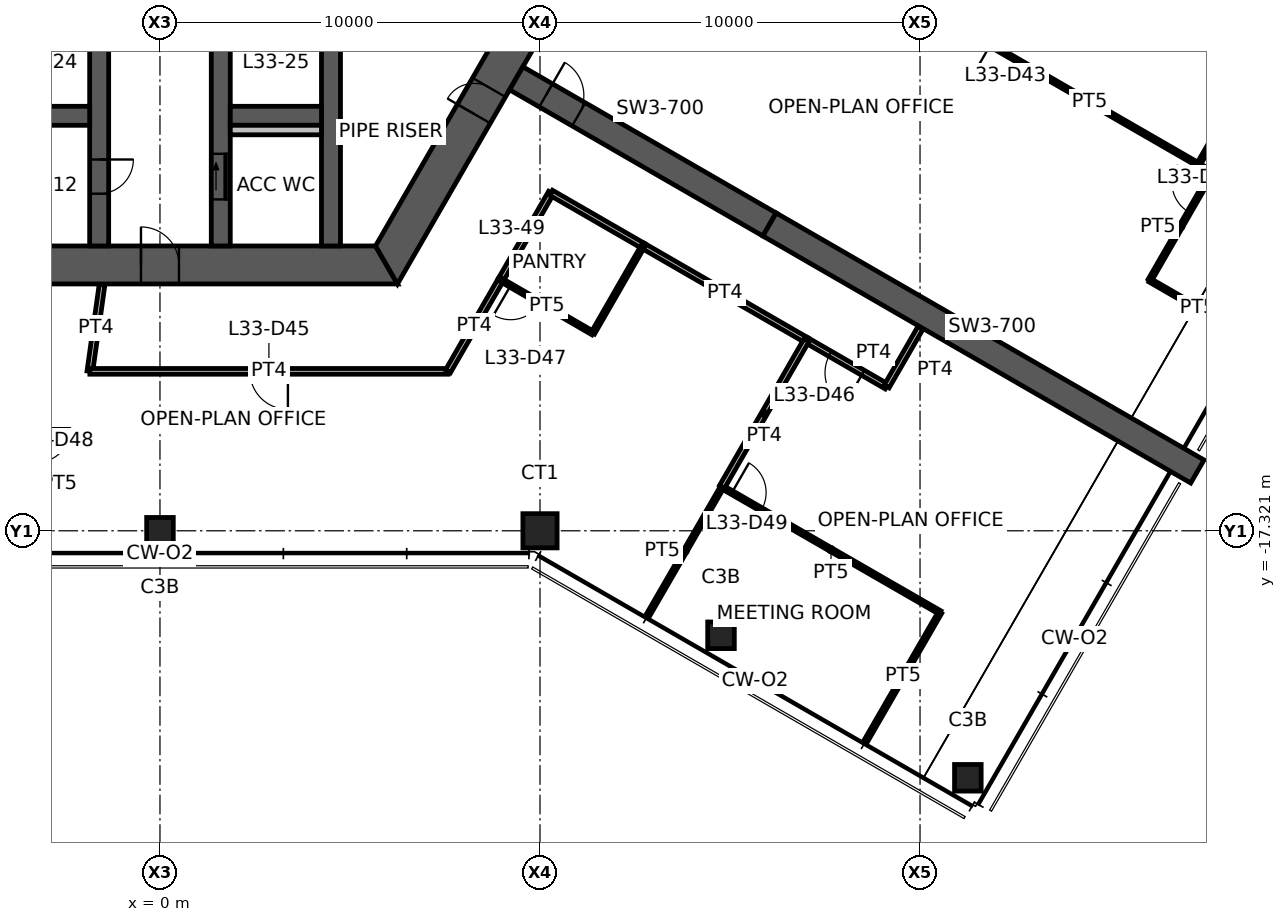
"""IFC4 building model, lengths in metres.
Left out: names, types, materials, properties, quantities, classifications, styles, units other than length and angle.
Written with IfcOpenShell. Run it as: python <this file> out.ifc"""

import sys

from ifc_helpers import new_model, si_unit, direction, frame, frame_2d, origin, origin_2d, place, context, subcontext, project, spatial, polyline, rectangle, hollow_rectangle, outline, extrude, element, fill, save


model = new_model("IFC4")
c1 = context("Model", 3, precision=1e-05, world=origin(), true_north=direction((0.0, 1.0)))
c2 = subcontext(c1, "Body", "Model", "MODEL_VIEW")
j1 = project(units=[si_unit("LENGTHUNIT", "METRE"), si_unit("PLANEANGLEUNIT", "RADIAN")], contexts=[c1])
p1 = place(None, origin())
s1 = spatial("IfcSite", under=j1, at=p1, CompositionType="ELEMENT")
p2 = place(p1, origin())
s2 = spatial("IfcBuilding", under=s1, at=p2, CompositionType="ELEMENT")
p3 = place(p2, frame((0.0, 0.0, 133.1)))
s3 = spatial("IfcBuildingStorey", under=s2, at=p3, CompositionType="ELEMENT", Elevation=133.1)
p4 = place(p3, frame((10.0, -17.321, 0.0), z_axis=(0.0, 0.0, 1.0), x_axis=(1.0, 0.0, 0.0)))
e1 = element("IfcColumn", 1, at=p4, inside=s3, PredefinedType="COLUMN", context=c2, shape_type="SweptSolid", body=[
    extrude(hollow_rectangle(XDim=0.9, YDim=0.9, WallThickness=0.07, at=origin_2d()), origin(), (0.0, 0.0, 1.0), 3.9),
])
for number, where, z_axis, x_axis in (
    (2, (0.0, -17.321, 0.0), (0.0, 0.0, 1.0), (1.0, 0.0, 0.0)),
    (3, (14.763, -20.071, 0.0), (0.0, 0.0, 1.0), (1.0, 0.0, 0.0)),
    (4, (21.258, -23.821, 0.0), (0.0, 0.0, 1.0), (1.0, 0.0, 0.0)),
):
    element("IfcColumn", number, at=place(p3, frame(where, z_axis=z_axis, x_axis=x_axis)), inside=s3, PredefinedType="COLUMN", context=c2, shape_type="SweptSolid", body=[
        extrude(hollow_rectangle(XDim=0.7, YDim=0.7, WallThickness=0.036, at=origin_2d()), origin(), (0.0, 0.0, 1.0), 3.9),
    ])
p5 = place(p3, frame((-5.961, -10.325, 0.0), z_axis=(0.0, 0.0, 1.0), x_axis=(1.0, 0.0, 0.0)))
e5 = element("IfcWall", 5, at=p5, inside=s3, PredefinedType="SHEAR", context=c2, shape_type="SweptSolid", body=[
    extrude(outline(polyline([(-0.289, -0.5), (5.461, -0.5), (6.461, -0.5), (12.211, -0.5), (11.634, 0.5), (6.461, 0.5), (5.461, 0.5), (0.289, 0.5), (-0.289, -0.5)])), origin(), (0.0, 0.0, 1.0), 3.9),
])
p6 = place(p5, frame((5.461, 0.0, 0.0)))
e6 = element("IfcOpeningElement", 6, at=p6, cuts=e5, PredefinedType="OPENING", context=c2, shape_type="SweptSolid", body=[
    extrude(rectangle(XDim=1.0, YDim=2.1, at=frame_2d((0.5, 1.05))), frame((0.0, 0.51, 0.0), z_axis=(0.0, -1.0, 0.0), x_axis=(1.0, 0.0, 0.0)), (0.0, 0.0, 1.0), 1.02),
])
p7 = place(p3, frame((5.961, -10.325, 0.0), z_axis=(0.0, 0.0, 1.0), x_axis=(0.500004296715, 0.866022923061, 0.0)))
e7 = element("IfcWall", 7, at=p7, inside=s3, PredefinedType="SHEAR", context=c2, shape_type="SweptSolid", body=[
    extrude(outline(polyline([(-0.289, -0.5), (4.594, -0.5), (5.394, -0.5), (12.211, -0.5), (11.634, 0.5), (5.394, 0.5), (4.594, 0.5), (0.289, 0.5), (-0.289, -0.5)])), origin(), (0.0, 0.0, 1.0), 3.9),
])
p8 = place(p7, frame((4.594, 0.0, 0.0)))
e8 = element("IfcOpeningElement", 8, at=p8, cuts=e7, PredefinedType="OPENING", context=c2, shape_type="SweptSolid", body=[
    extrude(rectangle(XDim=0.8, YDim=2.1, at=frame_2d((0.4, 1.05))), frame((0.0, 0.51, 0.0), z_axis=(0.0, -1.0, 0.0), x_axis=(1.0, 0.0, 0.0)), (0.0, 0.0, 1.0), 1.02),
])
p9 = place(p3, frame((9.375, -5.413, 0.0), z_axis=(0.0, 0.0, 1.0), x_axis=(0.866032377459, -0.499987921047, 0.0)))
e9 = element("IfcWall", 9, at=p9, inside=s3, PredefinedType="SHEAR", context=c2, shape_type="SweptSolid", body=[
    extrude(rectangle(XDim=7.696, YDim=0.7, at=frame_2d((3.848, 0.0))), origin(), (0.0, 0.0, 1.0), 3.9),
])
p10 = place(p9, frame((0.9, 0.0, 0.0)))
e10 = element("IfcOpeningElement", 10, at=p10, cuts=e9, PredefinedType="OPENING", context=c2, shape_type="SweptSolid", body=[
    extrude(rectangle(XDim=1.0, YDim=2.1, at=frame_2d((0.5, 1.05))), frame((0.0, 0.36, 0.0), z_axis=(0.0, -1.0, 0.0), x_axis=(1.0, 0.0, 0.0)), (0.0, 0.0, 1.0), 0.72),
])
p11 = place(p3, frame((16.039, -9.26, 0.0), z_axis=(0.0, 0.0, 1.0), x_axis=(0.866024837091, -0.50000098154, 0.0)))
e11 = element("IfcWall", 11, at=p11, inside=s3, PredefinedType="SHEAR", context=c2, shape_type="SweptSolid", body=[
    extrude(rectangle(XDim=13.0, YDim=0.7, at=frame_2d((6.5, 0.0))), origin(), (0.0, 0.0, 1.0), 3.9),
])
p12 = place(p3, frame((-1.6, -3.85, 0.0), z_axis=(0.0, 0.0, 1.0), x_axis=(0.0, -1.0, 0.0)))
e12 = element("IfcWall", 12, at=p12, inside=s3, PredefinedType="SHEAR", context=c2, shape_type="SweptSolid", body=[
    extrude(rectangle(XDim=5.975, YDim=0.5, at=frame_2d((2.987, 0.0))), origin(), (0.0, 0.0, 1.0), 3.9),
])
p13 = place(p12, frame((3.7, 0.0, 0.0)))
e13 = element("IfcOpeningElement", 13, at=p13, cuts=e12, PredefinedType="OPENING", context=c2, shape_type="SweptSolid", body=[
    extrude(rectangle(XDim=0.9, YDim=2.1, at=frame_2d((0.45, 1.05))), frame((0.0, 0.26, 0.0), z_axis=(0.0, -1.0, 0.0), x_axis=(1.0, 0.0, 0.0)), (0.0, 0.0, 1.0), 0.52),
])
p14 = place(p3, frame((1.6, -3.85, 0.0), z_axis=(0.0, 0.0, 1.0), x_axis=(0.0, -1.0, 0.0)))
e14 = element("IfcWall", 14, at=p14, inside=s3, PredefinedType="SHEAR", context=c2, shape_type="SweptSolid", body=[
    extrude(rectangle(XDim=5.975, YDim=0.5, at=frame_2d((2.987, 0.0))), origin(), (0.0, 0.0, 1.0), 3.9),
])
p15 = place(p14, frame((3.55, 0.0, 0.0)))
e15 = element("IfcOpeningElement", 15, at=p15, cuts=e14, PredefinedType="OPENING", context=c2, shape_type="SweptSolid", body=[
    extrude(rectangle(XDim=1.2, YDim=2.1, at=frame_2d((0.6, 1.05))), frame((0.0, 0.26, 0.0), z_axis=(0.0, -1.0, 0.0), x_axis=(1.0, 0.0, 0.0)), (0.0, 0.0, 1.0), 0.52),
])
p16 = place(p3, frame((4.5, -3.85, 0.0), z_axis=(0.0, 0.0, 1.0), x_axis=(0.0, -1.0, 0.0)))
e16 = element("IfcWall", 16, at=p16, inside=s3, PredefinedType="SHEAR", context=c2, shape_type="SweptSolid", body=[
    extrude(rectangle(XDim=5.975, YDim=0.5, at=frame_2d((2.987, 0.0))), origin(), (0.0, 0.0, 1.0), 3.9),
])
for number, where, z_axis, x_axis in (
    (17, (-4.25, -6.4, 0.0), (0.0, 0.0, 1.0), (1.0, 0.0, 0.0)),
    (18, (1.85, -6.4, 0.0), (0.0, 0.0, 1.0), (1.0, 0.0, 0.0)),
):
    element("IfcWall", number, at=place(p3, frame(where, z_axis=z_axis, x_axis=x_axis)), inside=s3, PredefinedType="SHEAR", context=c2, shape_type="SweptSolid", body=[
        extrude(rectangle(XDim=2.4, YDim=0.5, at=frame_2d((1.2, 0.0))), origin(), (0.0, 0.0, 1.0), 3.9),
    ])
p17 = place(p3, frame((1.85, -6.775, 0.0), z_axis=(0.0, 0.0, 1.0), x_axis=(1.0, 0.0, 0.0)))
e19 = element("IfcWall", 19, at=p17, inside=s3, PredefinedType="PLUMBINGWALL", context=c2, shape_type="SweptSolid", body=[
    extrude(rectangle(XDim=2.4, YDim=0.25, at=frame_2d((1.2, 0.0))), origin(), (0.0, 0.0, 1.0), 3.9),
])
p18 = place(p3, frame((29.077, -4.658, 0.0), z_axis=(0.0, 0.0, 1.0), x_axis=(-0.501313567819, -0.865265685625, 0.0)))
e20 = element("IfcWall", 20, at=p18, inside=s3, PredefinedType="PARTITIONING", context=c2, shape_type="SweptSolid", body=[
    extrude(rectangle(XDim=3.505, YDim=0.1, at=frame_2d((1.752, 0.0))), origin(), (0.0, 0.0, 1.0), 2.95),
])
p19 = place(p3, frame((27.327, -7.69, 0.0), z_axis=(0.0, 0.0, 1.0), x_axis=(-0.866318796728, 0.499491483847, 0.0)))
e21 = element("IfcWall", 21, at=p19, inside=s3, PredefinedType="PARTITIONING", context=c2, shape_type="SweptSolid", body=[
    extrude(rectangle(XDim=6.62, YDim=0.1, at=frame_2d((3.31, 0.0))), origin(), (0.0, 0.0, 1.0), 2.95),
])
p20 = place(p19, frame((5.42, 0.0, 0.0)))
e22 = element("IfcOpeningElement", 22, at=p20, cuts=e21, PredefinedType="OPENING", context=c2, shape_type="SweptSolid", body=[
    extrude(rectangle(XDim=0.9, YDim=2.1, at=frame_2d((0.45, 1.05))), frame((0.0, 0.06, 0.0), z_axis=(0.0, -1.0, 0.0), x_axis=(1.0, 0.0, 0.0)), (0.0, 0.0, 1.0), 0.12),
])
p21 = place(p3, frame((26.046, -10.727, 0.0), z_axis=(0.0, 0.0, 1.0), x_axis=(0.499765599164, 0.866160692881, 0.0)))
e23 = element("IfcWall", 23, at=p21, inside=s3, PredefinedType="PARTITIONING", context=c2, shape_type="SweptSolid", body=[
    extrude(rectangle(XDim=3.266, YDim=0.1, at=frame_2d((1.633, 0.0))), origin(), (0.0, 0.0, 1.0), 2.95),
])
p22 = place(p21, frame((2.066, 0.0, 0.0)))
e24 = element("IfcOpeningElement", 24, at=p22, cuts=e23, PredefinedType="OPENING", context=c2, shape_type="SweptSolid", body=[
    extrude(rectangle(XDim=0.9, YDim=2.1, at=frame_2d((0.45, 1.05))), frame((0.0, 0.06, 0.0), z_axis=(0.0, -1.0, 0.0), x_axis=(1.0, 0.0, 0.0)), (0.0, 0.0, 1.0), 0.12),
])
p23 = place(p3, frame((27.678, -7.898, 0.0), z_axis=(0.0, 0.0, 1.0), x_axis=(-0.859748322004, 0.510717948394, 0.0)))
e25 = element("IfcWall", 25, at=p23, inside=s3, PredefinedType="PARTITIONING", context=c2, shape_type="SweptSolid", body=[
    extrude(rectangle(XDim=0.409, YDim=0.1, at=frame_2d((0.205, 0.0))), origin(), (0.0, 0.0, 1.0), 2.95),
])
p24 = place(p3, frame((28.562, -12.18, 0.0), z_axis=(0.0, 0.0, 1.0), x_axis=(-0.866031657677, 0.499989167784, 0.0)))
e26 = element("IfcWall", 26, at=p24, inside=s3, PredefinedType="PARTITIONING", context=c2, shape_type="SweptSolid", body=[
    extrude(rectangle(XDim=2.905, YDim=0.1, at=frame_2d((1.453, 0.0))), origin(), (0.0, 0.0, 1.0), 2.95),
])
p25 = place(p3, frame((10.292, -8.425, 0.0), z_axis=(0.0, 0.0, 1.0), x_axis=(-0.499966561876, -0.866044708433, 0.0)))
e27 = element("IfcWall", 27, at=p25, inside=s3, PredefinedType="PARTITIONING", context=c2, shape_type="SweptSolid", body=[
    extrude(rectangle(XDim=2.655, YDim=0.15, at=frame_2d((1.328, 0.0))), origin(), (0.0, 0.0, 1.0), 2.95),
])
p26 = place(p3, frame((12.721, -9.827, 0.0), z_axis=(0.0, 0.0, 1.0), x_axis=(-0.866049342339, 0.499958534914, 0.0)))
e28 = element("IfcWall", 28, at=p26, inside=s3, PredefinedType="PARTITIONING", context=c2, shape_type="SweptSolid", body=[
    extrude(rectangle(XDim=2.805, YDim=0.15, at=frame_2d((1.402, 0.0))), origin(), (0.0, 0.0, 1.0), 2.95),
])
p27 = place(p3, frame((-1.844, -13.125, 0.0), z_axis=(0.0, 0.0, 1.0), x_axis=(0.139119980631, 0.990275532864, 0.0)))
e29 = element("IfcWall", 29, at=p27, inside=s3, PredefinedType="PARTITIONING", context=c2, shape_type="SweptSolid", body=[
    extrude(rectangle(XDim=2.302, YDim=0.15, at=frame_2d((1.151, 0.0))), origin(), (0.0, 0.0, 1.0), 2.95),
])
p28 = place(p3, frame((7.578, -13.125, 0.0), z_axis=(0.0, 0.0, 1.0), x_axis=(-1.0, 0.0, 0.0)))
e30 = element("IfcWall", 30, at=p28, inside=s3, PredefinedType="PARTITIONING", context=c2, shape_type="SweptSolid", body=[
    extrude(rectangle(XDim=9.422, YDim=0.15, at=frame_2d((4.711, 0.0))), origin(), (0.0, 0.0, 1.0), 2.95),
])
p29 = place(p28, frame((4.211, 0.0, 0.0)))
e31 = element("IfcOpeningElement", 31, at=p29, cuts=e30, PredefinedType="OPENING", context=c2, shape_type="SweptSolid", body=[
    extrude(rectangle(XDim=1.0, YDim=2.1, at=frame_2d((0.5, 1.05))), frame((0.0, 0.085, 0.0), z_axis=(0.0, -1.0, 0.0), x_axis=(1.0, 0.0, 0.0)), (0.0, 0.0, 1.0), 0.17),
])
p30 = place(p3, frame((8.969, -10.716, 0.0), z_axis=(0.0, 0.0, 1.0), x_axis=(-0.500008568482, -0.866020456713, 0.0)))
e32 = element("IfcWall", 32, at=p30, inside=s3, PredefinedType="PARTITIONING", context=c2, shape_type="SweptSolid", body=[
    extrude(rectangle(XDim=2.782, YDim=0.15, at=frame_2d((1.391, 0.0))), origin(), (0.0, 0.0, 1.0), 2.95),
])
p31 = place(p3, frame((17.021, -12.31, 0.0), z_axis=(0.0, 0.0, 1.0), x_axis=(-0.866018071205, 0.500012700186, 0.0)))
e33 = element("IfcWall", 33, at=p31, inside=s3, PredefinedType="PARTITIONING", context=c2, shape_type="SweptSolid", body=[
    extrude(rectangle(XDim=4.975, YDim=0.15, at=frame_2d((2.488, 0.0))), origin(), (0.0, 0.0, 1.0), 2.95),
])
p32 = place(p3, frame((19.121, -13.522, 0.0), z_axis=(0.0, 0.0, 1.0), x_axis=(-0.866000196749, 0.500043657324, 0.0)))
e34 = element("IfcWall", 34, at=p32, inside=s3, PredefinedType="PARTITIONING", context=c2, shape_type="SweptSolid", body=[
    extrude(rectangle(XDim=2.434, YDim=0.15, at=frame_2d((1.217, 0.0))), origin(), (0.0, 0.0, 1.0), 2.95),
])
p33 = place(p32, frame((0.717, 0.0, 0.0)))
e35 = element("IfcOpeningElement", 35, at=p33, cuts=e34, PredefinedType="OPENING", context=c2, shape_type="SweptSolid", body=[
    extrude(rectangle(XDim=1.0, YDim=2.1, at=frame_2d((0.5, 1.05))), frame((0.0, 0.085, 0.0), z_axis=(0.0, -1.0, 0.0), x_axis=(1.0, 0.0, 0.0)), (0.0, 0.0, 1.0), 0.17),
])
p34 = place(p3, frame((20.011, -11.981, 0.0), z_axis=(0.0, 0.0, 1.0), x_axis=(-0.500062787734, -0.865989150234, 0.0)))
e36 = element("IfcWall", 36, at=p34, inside=s3, PredefinedType="PARTITIONING", context=c2, shape_type="SweptSolid", body=[
    extrude(rectangle(XDim=1.78, YDim=0.15, at=frame_2d((0.89, 0.0))), origin(), (0.0, 0.0, 1.0), 2.95),
])
p35 = place(p3, frame((11.392, -12.119, 0.0), z_axis=(0.0, 0.0, 1.0), x_axis=(-0.865255114713, 0.501331812737, 0.0)))
e37 = element("IfcWall", 37, at=p35, inside=s3, PredefinedType="PARTITIONING", context=c2, shape_type="SweptSolid", body=[
    extrude(rectangle(XDim=2.8, YDim=0.1, at=frame_2d((1.4, 0.0))), origin(), (0.0, 0.0, 1.0), 2.95),
])
p36 = place(p35, frame((1.6, 0.0, 0.0)))
e38 = element("IfcOpeningElement", 38, at=p36, cuts=e37, PredefinedType="OPENING", context=c2, shape_type="SweptSolid", body=[
    extrude(rectangle(XDim=0.9, YDim=2.1, at=frame_2d((0.45, 1.05))), frame((0.0, 0.06, 0.0), z_axis=(0.0, -1.0, 0.0), x_axis=(1.0, 0.0, 0.0)), (0.0, 0.0, 1.0), 0.12),
])
p37 = place(p3, frame((12.713, -9.822, 0.0), z_axis=(0.0, 0.0, 1.0), x_axis=(-0.49852824611, -0.866873455488, 0.0)))
e39 = element("IfcWall", 39, at=p37, inside=s3, PredefinedType="PARTITIONING", context=c2, shape_type="SweptSolid", body=[
    extrude(rectangle(XDim=2.65, YDim=0.1, at=frame_2d((1.325, 0.0))), origin(), (0.0, 0.0, 1.0), 2.95),
])
p38 = place(p3, frame((12.84, -19.543, 0.0), z_axis=(0.0, 0.0, 1.0), x_axis=(0.501092951989, 0.865393467428, 0.0)))
e40 = element("IfcWall", 40, at=p38, inside=s3, PredefinedType="PARTITIONING", context=c2, shape_type="SweptSolid", body=[
    extrude(rectangle(XDim=3.905, YDim=0.1, at=frame_2d((1.953, 0.0))), origin(), (0.0, 0.0, 1.0), 2.95),
])
p39 = place(p3, frame((14.79, -16.165, 0.0), z_axis=(0.0, 0.0, 1.0), x_axis=(0.866359914703, -0.499420161984, 0.0)))
e41 = element("IfcWall", 41, at=p39, inside=s3, PredefinedType="PARTITIONING", context=c2, shape_type="SweptSolid", body=[
    extrude(rectangle(XDim=6.619, YDim=0.1, at=frame_2d((3.31, 0.0))), origin(), (0.0, 0.0, 1.0), 2.95),
])
p40 = place(p39, frame((0.3, 0.0, 0.0)))
e42 = element("IfcOpeningElement", 42, at=p40, cuts=e41, PredefinedType="OPENING", context=c2, shape_type="SweptSolid", body=[
    extrude(rectangle(XDim=0.9, YDim=2.1, at=frame_2d((0.45, 1.05))), frame((0.0, 0.06, 0.0), z_axis=(0.0, -1.0, 0.0), x_axis=(1.0, 0.0, 0.0)), (0.0, 0.0, 1.0), 0.12),
])
p41 = place(p3, frame((20.525, -19.471, 0.0), z_axis=(0.0, 0.0, 1.0), x_axis=(-0.499996613652, -0.866027358884, 0.0)))
e43 = element("IfcWall", 43, at=p41, inside=s3, PredefinedType="PARTITIONING", context=c2, shape_type="SweptSolid", body=[
    extrude(rectangle(XDim=3.88, YDim=0.1, at=frame_2d((1.94, 0.0))), origin(), (0.0, 0.0, 1.0), 2.95),
])
p42 = place(p3, frame((17.013, -12.305, 0.0), z_axis=(0.0, 0.0, 1.0), x_axis=(-0.499081704511, -0.866554933182, 0.0)))
e44 = element("IfcWall", 44, at=p42, inside=s3, PredefinedType="PARTITIONING", context=c2, shape_type="SweptSolid", body=[
    extrude(rectangle(XDim=4.454, YDim=0.15, at=frame_2d((2.227, 0.0))), origin(), (0.0, 0.0, 1.0), 2.95),
])
p43 = place(p6, origin())
e45 = element("IfcDoor", 45, at=p43, inside=s3, OperationType="SINGLE_SWING_LEFT", PredefinedType="DOOR", context=c2, shape_type="SweptSolid", body=[
    extrude(rectangle(XDim=1.0, YDim=2.1, at=frame_2d((0.5, 1.05))), frame((0.0, 0.025, 0.0), z_axis=(0.0, -1.0, 0.0), x_axis=(1.0, 0.0, 0.0)), (0.0, 0.0, 1.0), 0.05),
])
fill(e6, e45)
p44 = place(p8, origin())
e46 = element("IfcDoor", 46, at=p44, inside=s3, OperationType="SINGLE_SWING_LEFT", PredefinedType="DOOR", context=c2, shape_type="SweptSolid", body=[
    extrude(rectangle(XDim=0.8, YDim=2.1, at=frame_2d((0.4, 1.05))), frame((0.0, 0.025, 0.0), z_axis=(0.0, -1.0, 0.0), x_axis=(1.0, 0.0, 0.0)), (0.0, 0.0, 1.0), 0.05),
])
fill(e8, e46)
p45 = place(p15, origin())
e47 = element("IfcDoor", 47, at=p45, inside=s3, OperationType="SLIDING_TO_LEFT", PredefinedType="DOOR", context=c2, shape_type="SweptSolid", body=[
    extrude(rectangle(XDim=1.2, YDim=2.1, at=frame_2d((0.6, 1.05))), frame((0.0, 0.025, 0.0), z_axis=(0.0, -1.0, 0.0), x_axis=(1.0, 0.0, 0.0)), (0.0, 0.0, 1.0), 0.05),
])
fill(e15, e47)
p46 = place(p13, origin())
e48 = element("IfcDoor", 48, at=p46, inside=s3, OperationType="SINGLE_SWING_LEFT", PredefinedType="DOOR", context=c2, shape_type="SweptSolid", body=[
    extrude(rectangle(XDim=0.9, YDim=2.1, at=frame_2d((0.45, 1.05))), frame((0.0, 0.025, 0.0), z_axis=(0.0, -1.0, 0.0), x_axis=(1.0, 0.0, 0.0)), (0.0, 0.0, 1.0), 0.05),
])
fill(e13, e48)
p47 = place(p10, origin())
e49 = element("IfcDoor", 49, at=p47, inside=s3, OperationType="SINGLE_SWING_LEFT", PredefinedType="DOOR", context=c2, shape_type="SweptSolid", body=[
    extrude(rectangle(XDim=1.0, YDim=2.1, at=frame_2d((0.5, 1.05))), frame((0.0, 0.025, 0.0), z_axis=(0.0, -1.0, 0.0), x_axis=(1.0, 0.0, 0.0)), (0.0, 0.0, 1.0), 0.05),
])
fill(e10, e49)
p48 = place(p20, origin())
e50 = element("IfcDoor", 50, at=p48, inside=s3, OperationType="SINGLE_SWING_RIGHT", PredefinedType="DOOR", context=c2, shape_type="SweptSolid", body=[
    extrude(rectangle(XDim=0.9, YDim=2.1, at=frame_2d((0.45, 1.05))), frame((0.0, 0.025, 0.0), z_axis=(0.0, -1.0, 0.0), x_axis=(1.0, 0.0, 0.0)), (0.0, 0.0, 1.0), 0.05),
])
fill(e22, e50)
p49 = place(p22, origin())
e51 = element("IfcDoor", 51, at=p49, inside=s3, OperationType="SINGLE_SWING_RIGHT", PredefinedType="DOOR", context=c2, shape_type="SweptSolid", body=[
    extrude(rectangle(XDim=0.9, YDim=2.1, at=frame_2d((0.45, 1.05))), frame((0.0, 0.025, 0.0), z_axis=(0.0, -1.0, 0.0), x_axis=(1.0, 0.0, 0.0)), (0.0, 0.0, 1.0), 0.05),
])
fill(e24, e51)
p50 = place(p29, origin())
e52 = element("IfcDoor", 52, at=p50, inside=s3, OperationType="SINGLE_SWING_LEFT", PredefinedType="DOOR", context=c2, shape_type="SweptSolid", body=[
    extrude(rectangle(XDim=1.0, YDim=2.1, at=frame_2d((0.5, 1.05))), frame((0.0, 0.025, 0.0), z_axis=(0.0, -1.0, 0.0), x_axis=(1.0, 0.0, 0.0)), (0.0, 0.0, 1.0), 0.05),
])
fill(e31, e52)
p51 = place(p33, origin())
e53 = element("IfcDoor", 53, at=p51, inside=s3, OperationType="SINGLE_SWING_LEFT", PredefinedType="DOOR", context=c2, shape_type="SweptSolid", body=[
    extrude(rectangle(XDim=1.0, YDim=2.1, at=frame_2d((0.5, 1.05))), frame((0.0, 0.025, 0.0), z_axis=(0.0, -1.0, 0.0), x_axis=(1.0, 0.0, 0.0)), (0.0, 0.0, 1.0), 0.05),
])
fill(e35, e53)
p52 = place(p36, origin())
e54 = element("IfcDoor", 54, at=p52, inside=s3, OperationType="SINGLE_SWING_RIGHT", PredefinedType="DOOR", context=c2, shape_type="SweptSolid", body=[
    extrude(rectangle(XDim=0.9, YDim=2.1, at=frame_2d((0.45, 1.05))), frame((0.0, 0.025, 0.0), z_axis=(0.0, -1.0, 0.0), x_axis=(1.0, 0.0, 0.0)), (0.0, 0.0, 1.0), 0.05),
])
fill(e38, e54)
p53 = place(p40, origin())
e55 = element("IfcDoor", 55, at=p53, inside=s3, OperationType="SINGLE_SWING_LEFT", PredefinedType="DOOR", context=c2, shape_type="SweptSolid", body=[
    extrude(rectangle(XDim=0.9, YDim=2.1, at=frame_2d((0.45, 1.05))), frame((0.0, 0.025, 0.0), z_axis=(0.0, -1.0, 0.0), x_axis=(1.0, 0.0, 0.0)), (0.0, 0.0, 1.0), 0.05),
])
fill(e42, e55)
save(model, sys.argv[1])
